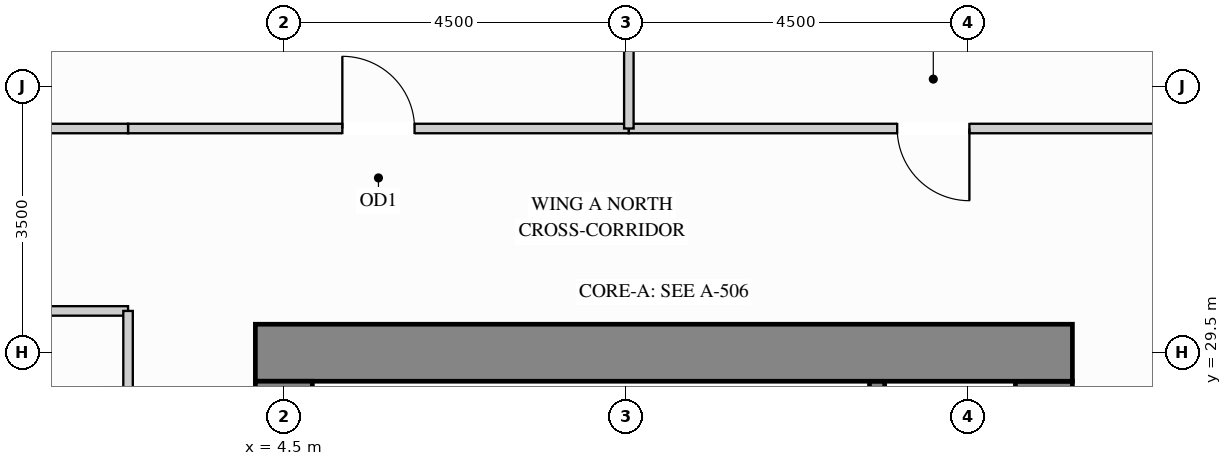
"""IFC4 building model, lengths in metres.
Left out: names, types, materials, properties, quantities, classifications, styles, units other than length and angle.
Written with IfcOpenShell. Run it as: python <this file> out.ifc"""

import sys

from ifc_helpers import new_model, si_unit, direction, frame, frame_2d, origin, place, context, subcontext, project, spatial, rectangle, extrude, source, transform, mapped, element, fill, save


model = new_model("IFC4")
c1 = context("Model", 3, precision=1e-05, world=origin(), true_north=direction((0.0, 1.0)))
c2 = subcontext(c1, "Body", "Model", "MODEL_VIEW")
j1 = project(units=[si_unit("LENGTHUNIT", "METRE"), si_unit("PLANEANGLEUNIT", "RADIAN")], contexts=[c1])
p1 = place(None, origin())
s1 = spatial("IfcSite", under=j1, at=p1, CompositionType="ELEMENT")
p2 = place(p1, origin())
s2 = spatial("IfcBuilding", under=s1, at=p2, CompositionType="ELEMENT")
p3 = place(p2, frame((0.0, 0.0, 106.2)))
s3 = spatial("IfcBuildingStorey", under=s2, at=p3, CompositionType="ELEMENT", Elevation=106.2)
m1 = source(origin(), c2, "Body", "SweptSolid", [
    extrude(rectangle(XDim=8.245, YDim=0.75, at=frame_2d((4.123, 0.0))), origin(), (0.0, 0.0, 1.0), 3.38),
])
p4 = place(p3, frame((14.5, 20.88, 0.0), z_axis=(0.0, 0.0, 1.0), x_axis=(0.0, 1.0, 0.0)))
e1 = element("IfcWall", 1, at=p4, inside=s3, PredefinedType="SHEAR", context=c2, shape_type="MappedRepresentation", body=[
    mapped(m1, transform((0.0, 0.0, 0.0), x_axis=(1.0, 0.0, 0.0), y_axis=(0.0, 1.0, 0.0), z_axis=(0.0, 0.0, 1.0))),
])
m2 = source(origin(), c2, "Body", "SweptSolid", [
    extrude(rectangle(XDim=10.75, YDim=0.75, at=frame_2d((5.375, 0.0))), origin(), (0.0, 0.0, 1.0), 3.38),
])
p5 = place(p3, frame((4.125, 29.5, 0.0), z_axis=(0.0, 0.0, 1.0), x_axis=(1.0, 0.0, 0.0)))
e2 = element("IfcWall", 2, at=p5, inside=s3, PredefinedType="SHEAR", context=c2, shape_type="MappedRepresentation", body=[
    mapped(m2, transform((0.0, 0.0, 0.0), x_axis=(1.0, 0.0, 0.0), y_axis=(0.0, 1.0, 0.0), z_axis=(0.0, 0.0, 1.0))),
])
m3 = source(origin(), c2, "Body", "SweptSolid", [
    extrude(rectangle(XDim=20.25, YDim=0.75, at=frame_2d((10.125, 0.0))), origin(), (0.0, 0.0, 1.0), 3.38),
])
p6 = place(p3, frame((4.5, 8.875, 0.0), z_axis=(0.0, 0.0, 1.0), x_axis=(0.0, 1.0, 0.0)))
e3 = element("IfcWall", 3, at=p6, inside=s3, PredefinedType="SHEAR", context=c2, shape_type="MappedRepresentation", body=[
    mapped(m3, transform((0.0, 0.0, 0.0), x_axis=(1.0, 0.0, 0.0), y_axis=(0.0, 1.0, 0.0), z_axis=(0.0, 0.0, 1.0))),
])
p7 = place(p3, frame((2.45, 32.45, 0.0), z_axis=(0.0, 0.0, 1.0), x_axis=(1.0, 0.0, 0.0)))
e4 = element("IfcWall", 4, at=p7, inside=s3, PredefinedType="PARTITIONING", context=c2, shape_type="SweptSolid", body=[
    extrude(rectangle(XDim=6.589, YDim=0.125, at=frame_2d((3.294, 0.0))), origin(), (0.0, 0.0, 1.0), 3.365),
])
p8 = place(p7, frame((2.82, 0.0, 0.0)))
e5 = element("IfcOpeningElement", 5, at=p8, cuts=e4, PredefinedType="OPENING", context=c2, shape_type="SweptSolid", body=[
    extrude(rectangle(XDim=0.95, YDim=2.15, at=frame_2d((0.475, 1.075))), frame((0.0, 0.073, 0.0), z_axis=(0.0, -1.0, 0.0), x_axis=(1.0, 0.0, 0.0)), (0.0, 0.0, 1.0), 0.145),
])
p9 = place(p3, frame((9.039, 32.45, 0.0), z_axis=(0.0, 0.0, 1.0), x_axis=(1.0, 0.0, 0.0)))
e6 = element("IfcWall", 6, at=p9, inside=s3, PredefinedType="PARTITIONING", context=c2, shape_type="SweptSolid", body=[
    extrude(rectangle(XDim=8.011, YDim=0.125, at=frame_2d((4.005, 0.0))), origin(), (0.0, 0.0, 1.0), 3.365),
])
p10 = place(p9, frame((3.531, 0.0, 0.0)))
e7 = element("IfcOpeningElement", 7, at=p10, cuts=e6, PredefinedType="OPENING", context=c2, shape_type="SweptSolid", body=[
    extrude(rectangle(XDim=0.95, YDim=2.15, at=frame_2d((0.475, 1.075))), frame((0.0, 0.073, 0.0), z_axis=(0.0, -1.0, 0.0), x_axis=(1.0, 0.0, 0.0)), (0.0, 0.0, 1.0), 0.145),
])
m4 = source(origin(), c2, "Body", "SweptSolid", [
    extrude(rectangle(XDim=2.098, YDim=0.125, at=frame_2d((1.049, 0.0))), origin(), (0.0, 0.0, 1.0), 3.365),
])
p11 = place(p3, frame((0.352, 32.45, 0.0), z_axis=(0.0, 0.0, 1.0), x_axis=(1.0, 0.0, 0.0)))
e8 = element("IfcWall", 8, at=p11, inside=s3, PredefinedType="PARTITIONING", context=c2, shape_type="MappedRepresentation", body=[
    mapped(m4, transform((0.0, 0.0, 0.0), x_axis=(1.0, 0.0, 0.0), y_axis=(0.0, 1.0, 0.0), z_axis=(0.0, 0.0, 1.0))),
])
m5 = source(origin(), c2, "Body", "SweptSolid", [
    extrude(rectangle(XDim=4.86, YDim=0.125, at=frame_2d((2.43, 0.0))), origin(), (0.0, 0.0, 1.0), 3.365),
])
p12 = place(p3, frame((9.039, 32.45, 0.0), z_axis=(0.0, 0.0, 1.0), x_axis=(0.0, 1.0, 0.0)))
e9 = element("IfcWall", 9, at=p12, inside=s3, PredefinedType="PARTITIONING", context=c2, shape_type="MappedRepresentation", body=[
    mapped(m5, transform((0.0, 0.0, 0.0), x_axis=(1.0, 0.0, 0.0), y_axis=(0.0, 1.0, 0.0), z_axis=(0.0, 0.0, 1.0))),
])
m6 = source(origin(), c2, "Body", "SweptSolid", [
    extrude(rectangle(XDim=1.26, YDim=0.125, at=frame_2d((0.63, 0.0))), origin(), (0.0, 0.0, 1.0), 3.365),
])
p13 = place(p3, frame((1.19, 30.05, 0.0), z_axis=(0.0, 0.0, 1.0), x_axis=(1.0, 0.0, 0.0)))
e10 = element("IfcWall", 10, at=p13, inside=s3, PredefinedType="PARTITIONING", context=c2, shape_type="MappedRepresentation", body=[
    mapped(m6, transform((0.0, 0.0, 0.0), x_axis=(1.0, 0.0, 0.0), y_axis=(0.0, 1.0, 0.0), z_axis=(0.0, 0.0, 1.0))),
])
p14 = place(p3, frame((2.45, 22.6, 0.0), z_axis=(0.0, 0.0, 1.0), x_axis=(0.0, 1.0, 0.0)))
e11 = element("IfcWall", 11, at=p14, inside=s3, PredefinedType="PARTITIONING", context=c2, shape_type="SweptSolid", body=[
    extrude(rectangle(XDim=7.45, YDim=0.125, at=frame_2d((3.725, 0.0))), origin(), (0.0, 0.0, 1.0), 3.365),
])
p15 = place(p14, frame((3.25, 0.0, 0.0)))
e12 = element("IfcOpeningElement", 12, at=p15, cuts=e11, PredefinedType="OPENING", context=c2, shape_type="SweptSolid", body=[
    extrude(rectangle(XDim=0.95, YDim=2.15, at=frame_2d((0.475, 1.075))), frame((0.0, 0.073, 0.0), z_axis=(0.0, -1.0, 0.0), x_axis=(1.0, 0.0, 0.0)), (0.0, 0.0, 1.0), 0.145),
])
m7 = source(origin(), c2, "Body", "SweptSolid", [
    extrude(rectangle(XDim=3.678, YDim=0.2, at=frame_2d((1.839, 0.0))), origin(), (0.0, 0.0, 1.0), 3.38),
])
p16 = place(p3, frame((12.305, 25.445, 0.0), z_axis=(0.0, 0.0, 1.0), x_axis=(0.0, 1.0, 0.0)))
e13 = element("IfcWall", 13, at=p16, inside=s3, PredefinedType="SHEAR", context=c2, shape_type="MappedRepresentation", body=[
    mapped(m7, transform((0.0, 0.0, 0.0), x_axis=(1.0, 0.0, 0.0), y_axis=(0.0, 1.0, 0.0), z_axis=(0.0, 0.0, 1.0))),
])
m8 = source(origin(), c2, "Body", "SweptSolid", [
    extrude(rectangle(XDim=0.95, YDim=2.15, at=frame_2d((0.475, 1.075))), frame((0.0, 0.025, 0.0), z_axis=(0.0, -1.0, 0.0), x_axis=(1.0, 0.0, 0.0)), (0.0, 0.0, 1.0), 0.05),
])
p17 = place(p8, origin())
e14 = element("IfcDoor", 14, at=p17, inside=s3, OperationType="SINGLE_SWING_LEFT", PredefinedType="DOOR", context=c2, shape_type="MappedRepresentation", body=[
    mapped(m8, transform((0.0, 0.0, 0.0), x_axis=(1.0, 0.0, 0.0), y_axis=(0.0, 1.0, 0.0), z_axis=(0.0, 0.0, 1.0))),
])
fill(e5, e14)
p18 = place(p10, origin())
e15 = element("IfcDoor", 15, at=p18, inside=s3, OperationType="SINGLE_SWING_RIGHT", PredefinedType="DOOR", context=c2, shape_type="MappedRepresentation", body=[
    mapped(m8, transform((0.0, 0.0, 0.0), x_axis=(1.0, 0.0, 0.0), y_axis=(0.0, 1.0, 0.0), z_axis=(0.0, 0.0, 1.0))),
])
fill(e7, e15)
save(model, sys.argv[1])
